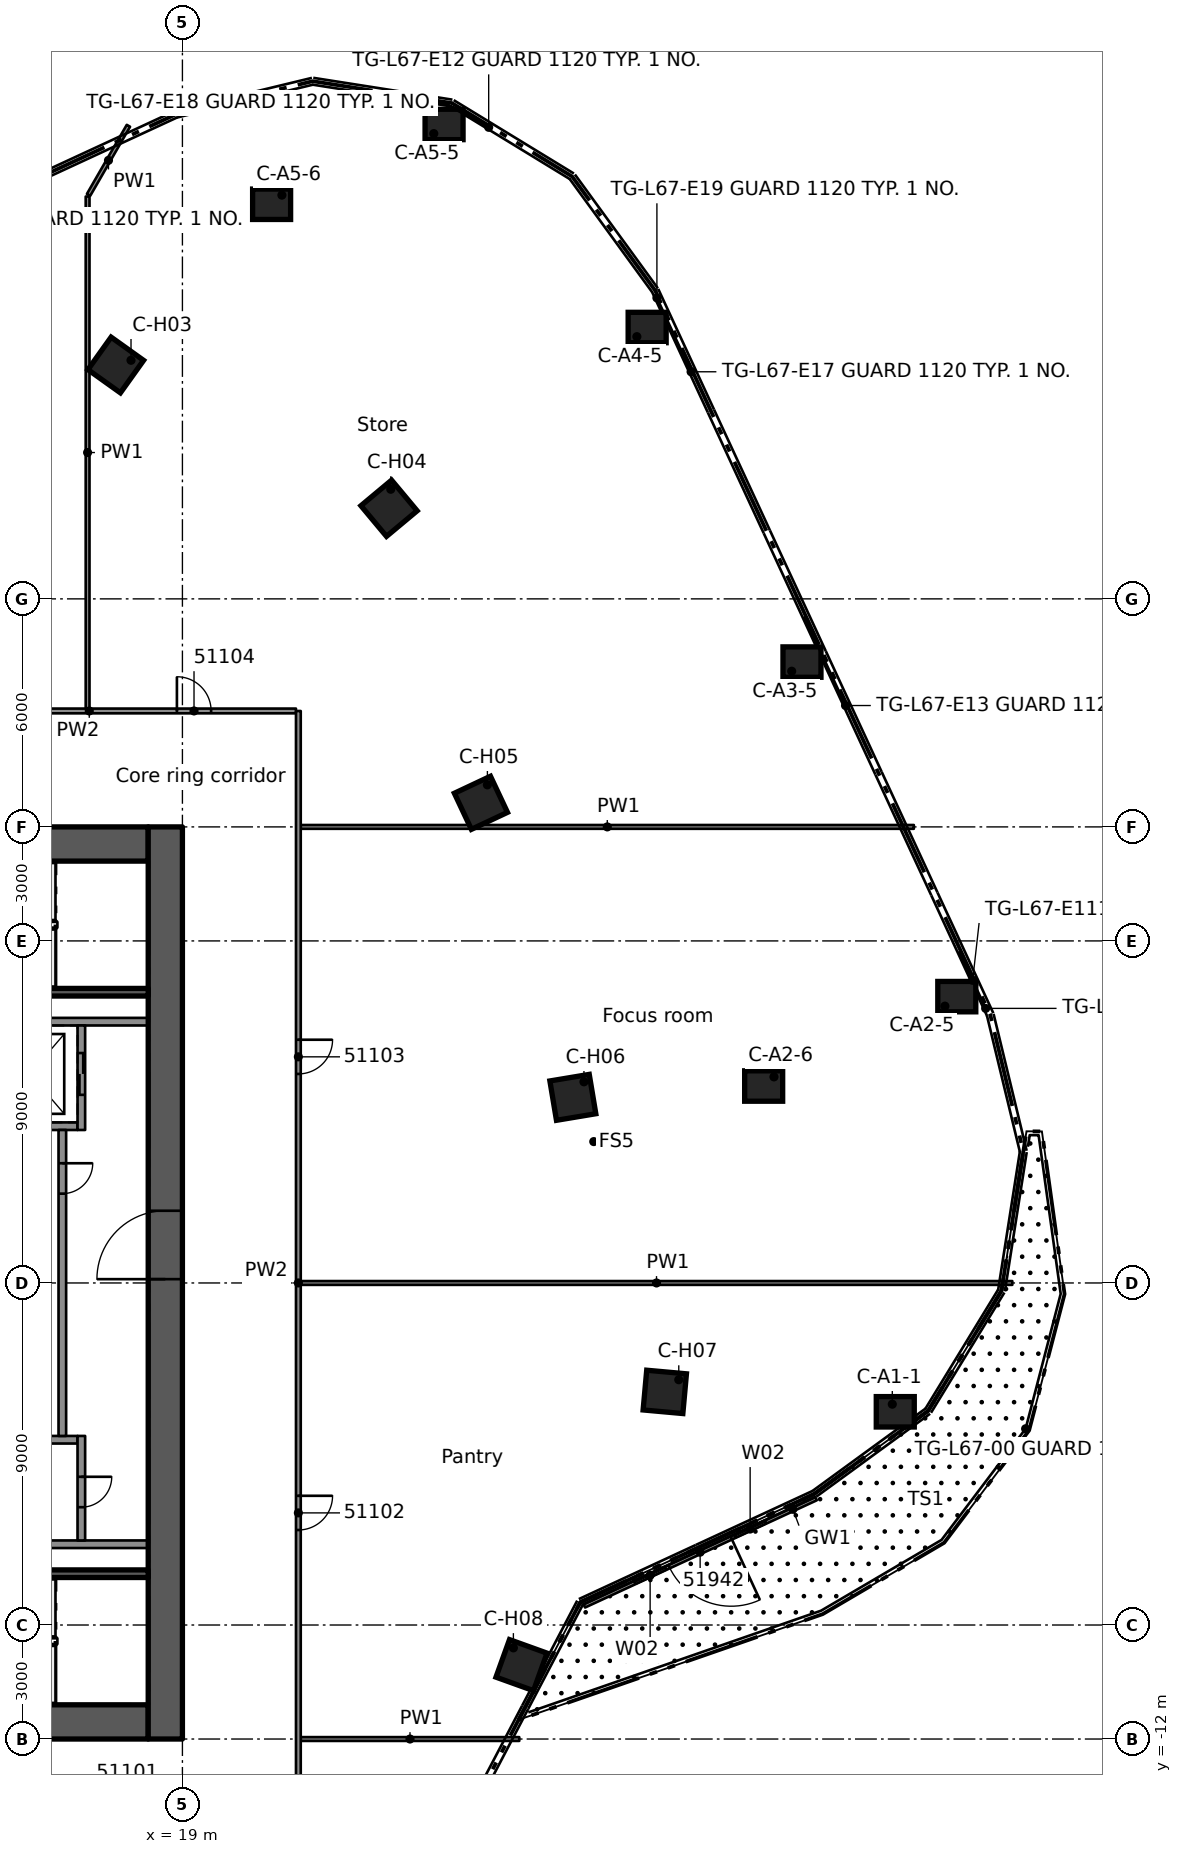
"""IFC4 building model, lengths in metres.
Left out: names, types, materials, properties, quantities, classifications, styles, units other than length and angle.
Written with IfcOpenShell. Run it as: python <this file> out.ifc"""

import sys

from ifc_helpers import new_model, si_unit, direction, frame, frame_2d, origin, origin_2d, place, context, subcontext, project, spatial, rectangle, extrude, element, fill, save


model = new_model("IFC4")
c1 = context("Model", 3, precision=1e-05, world=origin(), true_north=direction((0.0, 1.0)))
c2 = subcontext(c1, "Body", "Model", "MODEL_VIEW")
j1 = project(units=[si_unit("LENGTHUNIT", "METRE"), si_unit("PLANEANGLEUNIT", "RADIAN")], contexts=[c1])
p1 = place(None, origin())
s1 = spatial("IfcSite", under=j1, at=p1, CompositionType="ELEMENT")
p2 = place(p1, origin())
s2 = spatial("IfcBuilding", under=s1, at=p2, CompositionType="ELEMENT")
p3 = place(p2, frame((0.0, 0.0, 253.5)))
s3 = spatial("IfcBuildingStorey", under=s2, at=p3, CompositionType="ELEMENT", Elevation=253.5)
p4 = place(p3, frame((8.9, 11.55, 0.0), z_axis=(0.0, 0.0, 1.0), x_axis=(1.0, 0.0, 0.0)))
e1 = element("IfcWall", 1, at=p4, inside=s3, PredefinedType="SHEAR", context=c2, shape_type="SweptSolid", body=[
    extrude(rectangle(XDim=9.2, YDim=0.9, at=frame_2d((4.6, 0.0))), origin(), (0.0, 0.0, 1.0), 3.5),
])
p5 = place(p4, frame((0.5, 0.0, 0.0)))
e2 = element("IfcOpeningElement", 2, at=p5, cuts=e1, PredefinedType="OPENING", context=c2, shape_type="SweptSolid", body=[
    extrude(rectangle(XDim=1.8, YDim=2.1, at=frame_2d((0.9, 1.05))), frame((0.0, 0.46, 0.0), z_axis=(0.0, -1.0, 0.0), x_axis=(1.0, 0.0, 0.0)), (0.0, 0.0, 1.0), 0.92),
])
p6 = place(p4, frame((3.0, 0.0, 0.0)))
e3 = element("IfcOpeningElement", 3, at=p6, cuts=e1, PredefinedType="OPENING", context=c2, shape_type="SweptSolid", body=[
    extrude(rectangle(XDim=1.1, YDim=2.1, at=frame_2d((0.55, 1.05))), frame((0.0, 0.46, 0.0), z_axis=(0.0, -1.0, 0.0), x_axis=(1.0, 0.0, 0.0)), (0.0, 0.0, 1.0), 0.92),
])
p7 = place(p3, frame((8.9, -11.55, 0.0), z_axis=(0.0, 0.0, 1.0), x_axis=(1.0, 0.0, 0.0)))
e4 = element("IfcWall", 4, at=p7, inside=s3, PredefinedType="SHEAR", context=c2, shape_type="SweptSolid", body=[
    extrude(rectangle(XDim=9.2, YDim=0.9, at=frame_2d((4.6, 0.0))), origin(), (0.0, 0.0, 1.0), 3.5),
])
p8 = place(p7, frame((0.85, 0.0, 0.0)))
e5 = element("IfcOpeningElement", 5, at=p8, cuts=e4, PredefinedType="OPENING", context=c2, shape_type="SweptSolid", body=[
    extrude(rectangle(XDim=1.1, YDim=2.1, at=frame_2d((0.55, 1.05))), frame((0.0, 0.46, 0.0), z_axis=(0.0, -1.0, 0.0), x_axis=(1.0, 0.0, 0.0)), (0.0, 0.0, 1.0), 0.92),
])
p9 = place(p7, frame((3.0, 0.0, 0.0)))
e6 = element("IfcOpeningElement", 6, at=p9, cuts=e4, PredefinedType="OPENING", context=c2, shape_type="SweptSolid", body=[
    extrude(rectangle(XDim=1.1, YDim=2.1, at=frame_2d((0.55, 1.05))), frame((0.0, 0.46, 0.0), z_axis=(0.0, -1.0, 0.0), x_axis=(1.0, 0.0, 0.0)), (0.0, 0.0, 1.0), 0.92),
])
p10 = place(p3, frame((18.55, -12.0, 0.0), z_axis=(0.0, 0.0, 1.0), x_axis=(0.0, 1.0, 0.0)))
e7 = element("IfcWall", 7, at=p10, inside=s3, PredefinedType="SHEAR", context=c2, shape_type="SweptSolid", body=[
    extrude(rectangle(XDim=24.0, YDim=0.9, at=frame_2d((12.0, 0.0))), origin(), (0.0, 0.0, 1.0), 3.5),
])
p11 = place(p10, frame((12.1, 0.0, 0.0)))
e8 = element("IfcOpeningElement", 8, at=p11, cuts=e7, PredefinedType="OPENING", context=c2, shape_type="SweptSolid", body=[
    extrude(rectangle(XDim=1.8, YDim=2.1, at=frame_2d((0.9, 1.05))), frame((0.0, 0.46, 0.0), z_axis=(0.0, -1.0, 0.0), x_axis=(1.0, 0.0, 0.0)), (0.0, 0.0, 1.0), 0.92),
])
for number, where, z_axis, x_axis in (
    (9, (37.758, -3.39, 0.0), (0.0, 0.0, 1.0), (1.0, 0.0, 0.0)),
    (10, (39.377, 7.534, 0.0), (0.0, 0.0, 1.0), (1.0, 0.0, 0.0)),
    (11, (34.295, 5.182, 0.0), (0.0, 0.0, 1.0), (1.0, 0.0, 0.0)),
    (12, (35.303, 16.337, 0.0), (0.0, 0.0, 1.0), (1.0, 0.0, 0.0)),
    (13, (31.229, 25.14, 0.0), (0.0, 0.0, 1.0), (1.0, 0.0, 0.0)),
    (14, (25.885, 30.483, 0.0), (0.0, 0.0, 1.0), (1.0, 0.0, 0.0)),
    (15, (21.347, 28.383, 0.0), (0.0, 0.0, 1.0), (1.0, 0.0, 0.0)),
):
    element("IfcColumn", number, at=place(p3, frame(where, z_axis=z_axis, x_axis=x_axis)), inside=s3, PredefinedType="COLUMN", context=c2, shape_type="SweptSolid", body=[
        extrude(rectangle(XDim=1.0, YDim=0.8, at=origin_2d()), origin(), (0.0, 0.0, 1.0), 3.5),
    ])
for number, where, z_axis, x_axis in (
    (16, (17.246, 24.154, 0.0), (0.0, 0.0, 1.0), (0.581, 0.814, 0.0)),
    (17, (24.437, 20.384, 0.0), (0.0, 0.0, 1.0), (0.768, 0.641, 0.0)),
    (18, (26.855, 12.634, 0.0), (0.0, 0.0, 1.0), (0.905, 0.426, 0.0)),
    (19, (29.274, 4.884, 0.0), (0.0, 0.0, 1.0), (0.986, 0.165, 0.0)),
    (20, (31.693, -2.866, 0.0), (0.0, 0.0, 1.0), (0.996, -0.09, 0.0)),
    (21, (27.923, -10.056, 0.0), (0.0, 0.0, 1.0), (0.941, -0.339, 0.0)),
):
    element("IfcColumn", number, at=place(p3, frame(where, z_axis=z_axis, x_axis=x_axis)), inside=s3, PredefinedType="COLUMN", context=c2, shape_type="SweptSolid", body=[
        extrude(rectangle(XDim=1.05, YDim=1.05, at=origin_2d()), origin(), (0.0, 0.0, 1.0), 3.5),
    ])
for number, where, z_axis, x_axis in (
    (22, (11.54, -6.875, 0.0), (0.0, 0.0, 1.0), (1.0, 0.0, 0.0)),
    (23, (11.54, 6.875, 0.0), (0.0, 0.0, 1.0), (1.0, 0.0, 0.0)),
):
    element("IfcWall", number, at=place(p3, frame(where, z_axis=z_axis, x_axis=x_axis)), inside=s3, PredefinedType="SOLIDWALL", context=c2, shape_type="SweptSolid", body=[
        extrude(rectangle(XDim=6.56, YDim=0.2, at=frame_2d((3.28, 0.0))), origin(), (0.0, 0.0, 1.0), 3.09),
    ])
for number, where, z_axis, x_axis in (
    (24, (11.54, 4.125, 0.0), (0.0, 0.0, 1.0), (1.0, 0.0, 0.0)),
    (25, (11.54, -4.125, 0.0), (0.0, 0.0, 1.0), (1.0, 0.0, 0.0)),
):
    element("IfcWall", number, at=place(p3, frame(where, z_axis=z_axis, x_axis=x_axis)), inside=s3, PredefinedType="SOLIDWALL", context=c2, shape_type="SweptSolid", body=[
        extrude(rectangle(XDim=4.7, YDim=0.2, at=frame_2d((2.35, 0.0))), origin(), (0.0, 0.0, 1.0), 3.09),
    ])
p12 = place(p3, frame((16.34, 6.775, 0.0), z_axis=(0.0, 0.0, 1.0), x_axis=(0.0, -1.0, 0.0)))
e26 = element("IfcWall", 26, at=p12, inside=s3, PredefinedType="SOLIDWALL", context=c2, shape_type="SweptSolid", body=[
    extrude(rectangle(XDim=2.75, YDim=0.2, at=frame_2d((1.375, 0.0))), origin(), (0.0, 0.0, 1.0), 3.09),
])
p13 = place(p12, frame((0.725, 0.0, 0.0)))
e27 = element("IfcOpeningElement", 27, at=p13, cuts=e26, PredefinedType="OPENING", context=c2, shape_type="SweptSolid", body=[
    extrude(rectangle(XDim=1.1, YDim=2.1, at=frame_2d((0.55, 1.05))), frame((0.0, 0.11, 0.0), z_axis=(0.0, -1.0, 0.0), x_axis=(1.0, 0.0, 0.0)), (0.0, 0.0, 1.0), 0.22),
])
p14 = place(p3, frame((15.84, 4.025, 0.0), z_axis=(0.0, 0.0, 1.0), x_axis=(0.0, -1.0, 0.0)))
e28 = element("IfcWall", 28, at=p14, inside=s3, PredefinedType="SOLIDWALL", context=c2, shape_type="SweptSolid", body=[
    extrude(rectangle(XDim=8.05, YDim=0.2, at=frame_2d((4.025, 0.0))), origin(), (0.0, 0.0, 1.0), 3.09),
])
p15 = place(p14, frame((0.875, 0.0, 0.0)))
e29 = element("IfcOpeningElement", 29, at=p15, cuts=e28, PredefinedType="OPENING", context=c2, shape_type="SweptSolid", body=[
    extrude(rectangle(XDim=0.8, YDim=2.1, at=frame_2d((0.4, 1.05))), frame((0.0, 0.11, 0.0), z_axis=(0.0, -1.0, 0.0), x_axis=(1.0, 0.0, 0.0)), (0.0, 0.0, 1.0), 0.22),
])
p16 = place(p3, frame((16.34, -4.025, 0.0), z_axis=(0.0, 0.0, 1.0), x_axis=(0.0, -1.0, 0.0)))
e30 = element("IfcWall", 30, at=p16, inside=s3, PredefinedType="SOLIDWALL", context=c2, shape_type="SweptSolid", body=[
    extrude(rectangle(XDim=2.75, YDim=0.2, at=frame_2d((1.375, 0.0))), origin(), (0.0, 0.0, 1.0), 3.09),
])
p17 = place(p16, frame((1.075, 0.0, 0.0)))
e31 = element("IfcOpeningElement", 31, at=p17, cuts=e30, PredefinedType="OPENING", context=c2, shape_type="SweptSolid", body=[
    extrude(rectangle(XDim=0.8, YDim=2.1, at=frame_2d((0.4, 1.05))), frame((0.0, 0.11, 0.0), z_axis=(0.0, -1.0, 0.0), x_axis=(1.0, 0.0, 0.0)), (0.0, 0.0, 1.0), 0.22),
])
for number, where, z_axis, x_axis in (
    (32, (11.54, -7.65, 0.0), (0.0, 0.0, 1.0), (1.0, 0.0, 0.0)),
    (33, (11.54, 7.65, 0.0), (0.0, 0.0, 1.0), (1.0, 0.0, 0.0)),
):
    element("IfcWall", number, at=place(p3, frame(where, z_axis=z_axis, x_axis=x_axis)), inside=s3, PredefinedType="SOLIDWALL", context=c2, shape_type="SweptSolid", body=[
        extrude(rectangle(XDim=6.56, YDim=0.2, at=frame_2d((3.28, 0.0))), origin(), (0.0, 0.0, 1.0), 3.09),
    ])
p18 = place(p3, frame((35.672, -5.673, 0.0), z_axis=(0.0, 0.0, 1.0), x_axis=(-0.907548464316, -0.419947359699, 0.0)))
e34 = element("IfcWall", 34, at=p18, inside=s3, PredefinedType="STANDARD", context=c2, shape_type="SweptSolid", body=[
    extrude(rectangle(XDim=6.719, YDim=0.1, at=frame_2d((3.36, 0.0))), origin(), (0.0, 0.0, 1.0), 3.1),
])
p19 = place(p18, frame((2.46, 0.0, 0.0)))
e35 = element("IfcOpeningElement", 35, at=p19, cuts=e34, PredefinedType="OPENING", context=c2, shape_type="SweptSolid", body=[
    extrude(rectangle(XDim=1.8, YDim=2.4, at=frame_2d((0.9, 1.2))), frame((0.0, 0.06, 0.0), z_axis=(0.0, -1.0, 0.0), x_axis=(1.0, 0.0, 0.0)), (0.0, 0.0, 1.0), 0.12),
])
p20 = place(p18, frame((1.46, 0.0, 0.0)))
e36 = element("IfcOpeningElement", 36, at=p20, cuts=e34, PredefinedType="OPENING", context=c2, shape_type="SweptSolid", body=[
    extrude(rectangle(XDim=0.9, YDim=2.4, at=frame_2d((0.45, 1.2))), frame((0.0, 0.06, 0.0), z_axis=(0.0, -1.0, 0.0), x_axis=(1.0, 0.0, 0.0)), (0.0, 0.0, 1.0), 0.12),
])
p21 = place(p18, frame((4.36, 0.0, 0.0)))
e37 = element("IfcOpeningElement", 37, at=p21, cuts=e34, PredefinedType="OPENING", context=c2, shape_type="SweptSolid", body=[
    extrude(rectangle(XDim=0.9, YDim=2.4, at=frame_2d((0.45, 1.2))), frame((0.0, 0.06, 0.0), z_axis=(0.0, -1.0, 0.0), x_axis=(1.0, 0.0, 0.0)), (0.0, 0.0, 1.0), 0.12),
])
p22 = place(p3, frame((22.113, -12.0, 0.0), z_axis=(0.0, 0.0, 1.0), x_axis=(1.0, 0.0, 0.0)))
e38 = element("IfcWall", 38, at=p22, inside=s3, PredefinedType="PARTITIONING", context=c2, shape_type="SweptSolid", body=[
    extrude(rectangle(XDim=5.751, YDim=0.1, at=frame_2d((2.875, 0.0))), origin(), (0.0, 0.0, 1.0), 3.08),
])
p23 = place(p3, frame((22.113, 0.0, 0.0), z_axis=(0.0, 0.0, 1.0), x_axis=(1.0, 0.0, 0.0)))
e39 = element("IfcWall", 39, at=p23, inside=s3, PredefinedType="PARTITIONING", context=c2, shape_type="SweptSolid", body=[
    extrude(rectangle(XDim=18.725, YDim=0.1, at=frame_2d((9.362, 0.0))), origin(), (0.0, 0.0, 1.0), 3.08),
])
p24 = place(p3, frame((22.113, 12.0, 0.0), z_axis=(0.0, 0.0, 1.0), x_axis=(1.0, 0.0, 0.0)))
e40 = element("IfcWall", 40, at=p24, inside=s3, PredefinedType="PARTITIONING", context=c2, shape_type="SweptSolid", body=[
    extrude(rectangle(XDim=16.134, YDim=0.1, at=frame_2d((8.067, 0.0))), origin(), (0.0, 0.0, 1.0), 3.08),
])
p25 = place(p3, frame((11.11, 15.051, 0.0), z_axis=(0.0, 0.0, 1.0), x_axis=(1.0, 0.0, 0.0)))
e41 = element("IfcWall", 41, at=p25, inside=s3, PredefinedType="PARTITIONING", context=c2, shape_type="SweptSolid", body=[
    extrude(rectangle(XDim=10.878, YDim=0.125, at=frame_2d((5.439, 0.0))), origin(), (0.0, 0.0, 1.0), 3.08),
])
p26 = place(p25, frame((7.745, 0.0, 0.0)))
e42 = element("IfcOpeningElement", 42, at=p26, cuts=e41, PredefinedType="OPENING", context=c2, shape_type="SweptSolid", body=[
    extrude(rectangle(XDim=0.9, YDim=2.1, at=frame_2d((0.45, 1.05))), frame((0.0, 0.073, 0.0), z_axis=(0.0, -1.0, 0.0), x_axis=(1.0, 0.0, 0.0)), (0.0, 0.0, 1.0), 0.145),
])
p27 = place(p3, frame((16.53, 28.63, 0.0), z_axis=(0.0, 0.0, 1.0), x_axis=(0.499779509621, 0.866152666545, 0.0)))
e43 = element("IfcWall", 43, at=p27, inside=s3, PredefinedType="PARTITIONING", context=c2, shape_type="SweptSolid", body=[
    extrude(rectangle(XDim=2.099, YDim=0.1, at=frame_2d((1.05, 0.0))), origin(), (0.0, 0.0, 1.0), 3.08),
])
p28 = place(p3, frame((22.051, 15.05, 0.0), z_axis=(0.0, 0.0, 1.0), x_axis=(0.0, -1.0, 0.0)))
e44 = element("IfcWall", 44, at=p28, inside=s3, PredefinedType="PARTITIONING", context=c2, shape_type="SweptSolid", body=[
    extrude(rectangle(XDim=30.099, YDim=0.125, at=frame_2d((15.05, 0.0))), origin(), (0.0, 0.0, 1.0), 3.08),
])
p29 = place(p28, frame((20.65, 0.0, 0.0)))
e45 = element("IfcOpeningElement", 45, at=p29, cuts=e44, PredefinedType="OPENING", context=c2, shape_type="SweptSolid", body=[
    extrude(rectangle(XDim=0.9, YDim=2.1, at=frame_2d((0.45, 1.05))), frame((0.0, 0.073, 0.0), z_axis=(0.0, -1.0, 0.0), x_axis=(1.0, 0.0, 0.0)), (0.0, 0.0, 1.0), 0.145),
])
p30 = place(p28, frame((8.65, 0.0, 0.0)))
e46 = element("IfcOpeningElement", 46, at=p30, cuts=e44, PredefinedType="OPENING", context=c2, shape_type="SweptSolid", body=[
    extrude(rectangle(XDim=0.9, YDim=2.1, at=frame_2d((0.45, 1.05))), frame((0.0, 0.073, 0.0), z_axis=(0.0, -1.0, 0.0), x_axis=(1.0, 0.0, 0.0)), (0.0, 0.0, 1.0), 0.145),
])
p31 = place(p3, frame((16.505, 15.114, 0.0), z_axis=(0.0, 0.0, 1.0), x_axis=(0.0, 1.0, 0.0)))
e47 = element("IfcWall", 47, at=p31, inside=s3, PredefinedType="PARTITIONING", context=c2, shape_type="SweptSolid", body=[
    extrude(rectangle(XDim=13.473, YDim=0.1, at=frame_2d((6.736, 0.0))), origin(), (0.0, 0.0, 1.0), 3.08),
])
p32 = place(p13, origin())
e48 = element("IfcDoor", 48, at=p32, inside=s3, OperationType="DOUBLE_DOOR_SLIDING", PredefinedType="DOOR", context=c2, shape_type="SweptSolid", body=[
    extrude(rectangle(XDim=1.1, YDim=2.1, at=frame_2d((0.55, 1.05))), frame((0.0, 0.025, 0.0), z_axis=(0.0, -1.0, 0.0), x_axis=(1.0, 0.0, 0.0)), (0.0, 0.0, 1.0), 0.05),
])
fill(e27, e48)
p33 = place(p15, origin())
e49 = element("IfcDoor", 49, at=p33, inside=s3, OperationType="SINGLE_SWING_LEFT", PredefinedType="DOOR", context=c2, shape_type="SweptSolid", body=[
    extrude(rectangle(XDim=0.8, YDim=2.1, at=frame_2d((0.4, 1.05))), frame((0.0, 0.025, 0.0), z_axis=(0.0, -1.0, 0.0), x_axis=(1.0, 0.0, 0.0)), (0.0, 0.0, 1.0), 0.05),
])
fill(e29, e49)
p34 = place(p17, origin())
e50 = element("IfcDoor", 50, at=p34, inside=s3, OperationType="SINGLE_SWING_LEFT", PredefinedType="DOOR", context=c2, shape_type="SweptSolid", body=[
    extrude(rectangle(XDim=0.8, YDim=2.1, at=frame_2d((0.4, 1.05))), frame((0.0, 0.025, 0.0), z_axis=(0.0, -1.0, 0.0), x_axis=(1.0, 0.0, 0.0)), (0.0, 0.0, 1.0), 0.05),
])
fill(e31, e50)
p35 = place(p11, origin())
e51 = element("IfcDoor", 51, at=p35, inside=s3, OperationType="SINGLE_SWING_RIGHT", PredefinedType="DOOR", context=c2, shape_type="SweptSolid", body=[
    extrude(rectangle(XDim=1.8, YDim=2.1, at=frame_2d((0.9, 1.05))), frame((0.0, 0.025, 0.0), z_axis=(0.0, -1.0, 0.0), x_axis=(1.0, 0.0, 0.0)), (0.0, 0.0, 1.0), 0.05),
])
fill(e8, e51)
p36 = place(p19, origin())
e52 = element("IfcDoor", 52, at=p36, inside=s3, OperationType="DOUBLE_DOOR_SINGLE_SWING", PredefinedType="DOOR", context=c2, shape_type="SweptSolid", body=[
    extrude(rectangle(XDim=1.8, YDim=2.4, at=frame_2d((0.9, 1.2))), frame((0.0, 0.025, 0.0), z_axis=(0.0, -1.0, 0.0), x_axis=(1.0, 0.0, 0.0)), (0.0, 0.0, 1.0), 0.05),
])
fill(e35, e52)
p37 = place(p20, origin())
e53 = element("IfcWindow", 53, at=p37, inside=s3, PartitioningType="SINGLE_PANEL", PredefinedType="WINDOW", context=c2, shape_type="SweptSolid", body=[
    extrude(rectangle(XDim=0.9, YDim=2.4, at=frame_2d((0.45, 1.2))), frame((0.0, 0.03, 0.0), z_axis=(0.0, -1.0, 0.0), x_axis=(1.0, 0.0, 0.0)), (0.0, 0.0, 1.0), 0.06),
])
fill(e36, e53)
p38 = place(p21, origin())
e54 = element("IfcWindow", 54, at=p38, inside=s3, PartitioningType="SINGLE_PANEL", PredefinedType="WINDOW", context=c2, shape_type="SweptSolid", body=[
    extrude(rectangle(XDim=0.9, YDim=2.4, at=frame_2d((0.45, 1.2))), frame((0.0, 0.03, 0.0), z_axis=(0.0, -1.0, 0.0), x_axis=(1.0, 0.0, 0.0)), (0.0, 0.0, 1.0), 0.06),
])
fill(e37, e54)
p39 = place(p29, origin())
e55 = element("IfcDoor", 55, at=p39, inside=s3, OperationType="SINGLE_SWING_RIGHT", PredefinedType="DOOR", context=c2, shape_type="SweptSolid", body=[
    extrude(rectangle(XDim=0.9, YDim=2.1, at=frame_2d((0.45, 1.05))), frame((0.0, 0.025, 0.0), z_axis=(0.0, -1.0, 0.0), x_axis=(1.0, 0.0, 0.0)), (0.0, 0.0, 1.0), 0.05),
])
fill(e45, e55)
p40 = place(p30, origin())
e56 = element("IfcDoor", 56, at=p40, inside=s3, OperationType="SINGLE_SWING_LEFT", PredefinedType="DOOR", context=c2, shape_type="SweptSolid", body=[
    extrude(rectangle(XDim=0.9, YDim=2.1, at=frame_2d((0.45, 1.05))), frame((0.0, 0.025, 0.0), z_axis=(0.0, -1.0, 0.0), x_axis=(1.0, 0.0, 0.0)), (0.0, 0.0, 1.0), 0.05),
])
fill(e46, e56)
p41 = place(p26, origin())
e57 = element("IfcDoor", 57, at=p41, inside=s3, OperationType="SINGLE_SWING_RIGHT", PredefinedType="DOOR", context=c2, shape_type="SweptSolid", body=[
    extrude(rectangle(XDim=0.9, YDim=2.1, at=frame_2d((0.45, 1.05))), frame((0.0, 0.025, 0.0), z_axis=(0.0, -1.0, 0.0), x_axis=(1.0, 0.0, 0.0)), (0.0, 0.0, 1.0), 0.05),
])
fill(e42, e57)
save(model, sys.argv[1])
